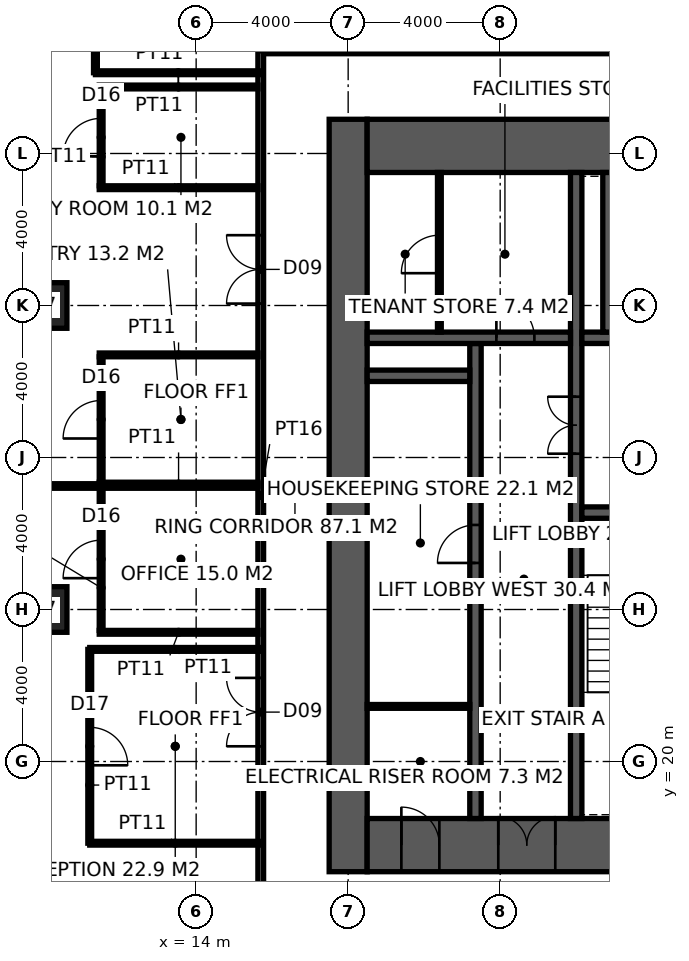
"""IFC4 building model, lengths in metres.
Left out: names, types, materials, properties, quantities, classifications, styles, units other than length and angle.
Written with IfcOpenShell. Run it as: python <this file> out.ifc"""

import sys

from ifc_helpers import new_model, si_unit, direction, frame, frame_2d, origin, origin_2d, place, context, subcontext, project, spatial, rectangle, hollow_rectangle, extrude, element, fill, save


model = new_model("IFC4")
c1 = context("Model", 3, precision=1e-05, world=origin(), true_north=direction((0.0, 1.0)))
c2 = subcontext(c1, "Body", "Model", "MODEL_VIEW")
j1 = project(units=[si_unit("LENGTHUNIT", "METRE"), si_unit("PLANEANGLEUNIT", "RADIAN")], contexts=[c1])
p1 = place(None, origin())
s1 = spatial("IfcSite", under=j1, at=p1, CompositionType="ELEMENT")
p2 = place(p1, origin())
s2 = spatial("IfcBuilding", under=s1, at=p2, CompositionType="ELEMENT")
p3 = place(p2, frame((0.0, 0.0, 15.0)))
s3 = spatial("IfcBuildingStorey", under=s2, at=p3, CompositionType="ELEMENT", Elevation=15.0)
for number, where, z_axis, x_axis in (
    (1, (10.0, 24.0, 0.0), (0.0, 0.0, 1.0), (1.0, 0.0, 0.0)),
    (2, (10.0, 32.0, 0.0), (0.0, 0.0, 1.0), (1.0, 0.0, 0.0)),
):
    element("IfcColumn", number, at=place(p3, frame(where, z_axis=z_axis, x_axis=x_axis)), inside=s3, PredefinedType="COLUMN", context=c2, shape_type="SweptSolid", body=[
        extrude(hollow_rectangle(XDim=1.2, YDim=1.2, WallThickness=0.1, at=origin_2d()), origin(), (0.0, 0.0, 1.0), 4.0),
    ])
p4 = place(p3, frame((18.0, 17.1, -0.15), z_axis=(0.0, 0.0, 1.0), x_axis=(0.0, 1.0, 0.0)))
e3 = element("IfcWall", 3, at=p4, inside=s3, PredefinedType="SHEAR", context=c2, shape_type="SweptSolid", body=[
    extrude(rectangle(XDim=19.8, YDim=1.0, at=frame_2d((9.9, 0.0))), origin(), (0.0, 0.0, 1.0), 4.0),
])
p5 = place(p3, frame((18.5, 17.8, -0.15), z_axis=(0.0, 0.0, 1.0), x_axis=(1.0, 0.0, 0.0)))
e4 = element("IfcWall", 4, at=p5, inside=s3, PredefinedType="SHEAR", context=c2, shape_type="SweptSolid", body=[
    extrude(rectangle(XDim=23.0, YDim=1.4, at=frame_2d((11.5, 0.0))), origin(), (0.0, 0.0, 1.0), 4.0),
])
p6 = place(p5, frame((3.45, 0.0, 0.15)))
e5 = element("IfcOpeningElement", 5, at=p6, cuts=e4, PredefinedType="OPENING", context=c2, shape_type="SweptSolid", body=[
    extrude(rectangle(XDim=1.5, YDim=2.4, at=frame_2d((0.75, 1.2))), frame((0.0, 0.71, 0.0), z_axis=(0.0, -1.0, 0.0), x_axis=(1.0, 0.0, 0.0)), (0.0, 0.0, 1.0), 1.42),
])
p7 = place(p5, frame((17.9, 0.0, 0.15)))
e6 = element("IfcOpeningElement", 6, at=p7, cuts=e4, PredefinedType="OPENING", context=c2, shape_type="SweptSolid", body=[
    extrude(rectangle(XDim=1.5, YDim=2.4, at=frame_2d((0.75, 1.2))), frame((0.0, 0.71, 0.0), z_axis=(0.0, -1.0, 0.0), x_axis=(1.0, 0.0, 0.0)), (0.0, 0.0, 1.0), 1.42),
])
p8 = place(p5, frame((0.9, 0.0, 0.15)))
e7 = element("IfcOpeningElement", 7, at=p8, cuts=e4, PredefinedType="OPENING", context=c2, shape_type="SweptSolid", body=[
    extrude(rectangle(XDim=1.0, YDim=2.2, at=frame_2d((0.5, 1.1))), frame((0.0, 0.71, 0.0), z_axis=(0.0, -1.0, 0.0), x_axis=(1.0, 0.0, 0.0)), (0.0, 0.0, 1.0), 1.42),
])
p9 = place(p3, frame((18.5, 36.2, -0.15), z_axis=(0.0, 0.0, 1.0), x_axis=(1.0, 0.0, 0.0)))
e8 = element("IfcWall", 8, at=p9, inside=s3, PredefinedType="SHEAR", context=c2, shape_type="SweptSolid", body=[
    extrude(rectangle(XDim=23.0, YDim=1.4, at=frame_2d((11.5, 0.0))), origin(), (0.0, 0.0, 1.0), 4.0),
])
p10 = place(p3, frame((24.0, 18.5, -0.15), z_axis=(0.0, 0.0, 1.0), x_axis=(0.0, 1.0, 0.0)))
e9 = element("IfcWall", 9, at=p10, inside=s3, PredefinedType="SHEAR", context=c2, shape_type="SweptSolid", body=[
    extrude(rectangle(XDim=17.0, YDim=0.3, at=frame_2d((8.5, 0.0))), origin(), (0.0, 0.0, 1.0), 4.0),
])
p11 = place(p10, frame((9.6, 0.0, 0.15)))
e10 = element("IfcOpeningElement", 10, at=p11, cuts=e9, PredefinedType="OPENING", context=c2, shape_type="SweptSolid", body=[
    extrude(rectangle(XDim=1.5, YDim=2.4, at=frame_2d((0.75, 1.2))), frame((0.0, 0.16, 0.0), z_axis=(0.0, -1.0, 0.0), x_axis=(1.0, 0.0, 0.0)), (0.0, 0.0, 1.0), 0.32),
])
p12 = place(p3, frame((24.15, 26.55, -0.15), z_axis=(0.0, 0.0, 1.0), x_axis=(1.0, 0.0, 0.0)))
e11 = element("IfcWall", 11, at=p12, inside=s3, PredefinedType="SHEAR", context=c2, shape_type="SweptSolid", body=[
    extrude(rectangle(XDim=11.25, YDim=0.3, at=frame_2d((5.625, 0.0))), origin(), (0.0, 0.0, 1.0), 4.0),
])
p13 = place(p12, frame((9.25, 0.0, 0.15)))
e12 = element("IfcOpeningElement", 12, at=p13, cuts=e11, PredefinedType="OPENING", context=c2, shape_type="SweptSolid", body=[
    extrude(rectangle(XDim=1.0, YDim=2.2, at=frame_2d((0.5, 1.1))), frame((0.0, 0.16, 0.0), z_axis=(0.0, -1.0, 0.0), x_axis=(1.0, 0.0, 0.0)), (0.0, 0.0, 1.0), 0.32),
])
p14 = place(p12, frame((4.9, 0.0, 0.15)))
e13 = element("IfcOpeningElement", 13, at=p14, cuts=e11, PredefinedType="OPENING", context=c2, shape_type="SweptSolid", body=[
    extrude(rectangle(XDim=1.5, YDim=2.4, at=frame_2d((0.75, 1.2))), frame((0.0, 0.16, 0.0), z_axis=(0.0, -1.0, 0.0), x_axis=(1.0, 0.0, 0.0)), (0.0, 0.0, 1.0), 0.32),
])
p15 = place(p3, frame((24.15, 31.15, -0.15), z_axis=(0.0, 0.0, 1.0), x_axis=(1.0, 0.0, 0.0)))
e14 = element("IfcWall", 14, at=p15, inside=s3, PredefinedType="SHEAR", context=c2, shape_type="SweptSolid", body=[
    extrude(rectangle(XDim=11.25, YDim=0.3, at=frame_2d((5.625, 0.0))), origin(), (0.0, 0.0, 1.0), 4.0),
])
p16 = place(p15, frame((7.25, 0.0, 0.15)))
e15 = element("IfcOpeningElement", 15, at=p16, cuts=e14, PredefinedType="OPENING", context=c2, shape_type="SweptSolid", body=[
    extrude(rectangle(XDim=1.4, YDim=2.4, at=frame_2d((0.7, 1.2))), frame((0.0, 0.16, 0.0), z_axis=(0.0, -1.0, 0.0), x_axis=(1.0, 0.0, 0.0)), (0.0, 0.0, 1.0), 0.32),
])
p17 = place(p3, frame((21.35, 18.5, -0.15), z_axis=(0.0, 0.0, 1.0), x_axis=(0.0, 1.0, 0.0)))
e16 = element("IfcWall", 16, at=p17, inside=s3, PredefinedType="SHEAR", context=c2, shape_type="SweptSolid", body=[
    extrude(rectangle(XDim=12.5, YDim=0.3, at=frame_2d((6.25, 0.0))), origin(), (0.0, 0.0, 1.0), 4.0),
])
p18 = place(p17, frame((6.725, 0.0, 0.15)))
e17 = element("IfcOpeningElement", 17, at=p18, cuts=e16, PredefinedType="OPENING", context=c2, shape_type="SweptSolid", body=[
    extrude(rectangle(XDim=1.0, YDim=2.2, at=frame_2d((0.5, 1.1))), frame((0.0, 0.16, 0.0), z_axis=(0.0, -1.0, 0.0), x_axis=(1.0, 0.0, 0.0)), (0.0, 0.0, 1.0), 0.32),
])
p19 = place(p3, frame((18.5, 31.15, -0.15), z_axis=(0.0, 0.0, 1.0), x_axis=(1.0, 0.0, 0.0)))
e18 = element("IfcWall", 18, at=p19, inside=s3, PredefinedType="SHEAR", context=c2, shape_type="SweptSolid", body=[
    extrude(rectangle(XDim=5.35, YDim=0.3, at=frame_2d((2.675, 0.0))), origin(), (0.0, 0.0, 1.0), 4.0),
])
p20 = place(p19, frame((3.4, 0.0, 0.15)))
e19 = element("IfcOpeningElement", 19, at=p20, cuts=e18, PredefinedType="OPENING", context=c2, shape_type="SweptSolid", body=[
    extrude(rectangle(XDim=1.0, YDim=2.2, at=frame_2d((0.5, 1.1))), frame((0.0, 0.16, 0.0), z_axis=(0.0, -1.0, 0.0), x_axis=(1.0, 0.0, 0.0)), (0.0, 0.0, 1.0), 0.32),
])
p21 = place(p3, frame((18.5, 30.15, -0.15), z_axis=(0.0, 0.0, 1.0), x_axis=(1.0, 0.0, 0.0)))
e20 = element("IfcWall", 20, at=p21, inside=s3, PredefinedType="SHEAR", context=c2, shape_type="SweptSolid", body=[
    extrude(rectangle(XDim=2.7, YDim=0.3, at=frame_2d((1.35, 0.0))), origin(), (0.0, 0.0, 1.0), 4.0),
])
p22 = place(p3, frame((24.85, 31.3, -0.15), z_axis=(0.0, 0.0, 1.0), x_axis=(0.0, 1.0, 0.0)))
e21 = element("IfcWall", 21, at=p22, inside=s3, PredefinedType="SHEAR", context=c2, shape_type="SweptSolid", body=[
    extrude(rectangle(XDim=4.2, YDim=0.3, at=frame_2d((2.1, 0.0))), origin(), (0.0, 0.0, 1.0), 4.0),
])
p23 = place(p3, frame((20.4, 31.3, 0.0), z_axis=(0.0, 0.0, 1.0), x_axis=(0.0, 1.0, 0.0)))
e22 = element("IfcWall", 22, at=p23, inside=s3, PredefinedType="PARTITIONING", context=c2, shape_type="SweptSolid", body=[
    extrude(rectangle(XDim=4.2, YDim=0.1, at=frame_2d((2.1, 0.0))), origin(), (0.0, 0.0, 1.0), 3.85),
])
p24 = place(p23, frame((1.55, 0.0, 0.0)))
e23 = element("IfcOpeningElement", 23, at=p24, cuts=e22, PredefinedType="OPENING", context=c2, shape_type="SweptSolid", body=[
    extrude(rectangle(XDim=1.0, YDim=2.2, at=frame_2d((0.5, 1.1))), frame((0.0, 0.06, 0.0), z_axis=(0.0, -1.0, 0.0), x_axis=(1.0, 0.0, 0.0)), (0.0, 0.0, 1.0), 0.12),
])
p25 = place(p3, frame((18.5, 21.45, 0.0), z_axis=(0.0, 0.0, 1.0), x_axis=(1.0, 0.0, 0.0)))
e24 = element("IfcWall", 24, at=p25, inside=s3, PredefinedType="PARTITIONING", context=c2, shape_type="SweptSolid", body=[
    extrude(rectangle(XDim=2.7, YDim=0.1, at=frame_2d((1.35, 0.0))), origin(), (0.0, 0.0, 1.0), 3.85),
])
p26 = place(p3, frame((15.7, 15.225, 0.0), z_axis=(0.0, 0.0, 1.0), x_axis=(0.0, 1.0, 0.0)))
e25 = element("IfcWall", 25, at=p26, inside=s3, PredefinedType="PARTITIONING", context=c2, shape_type="SweptSolid", body=[
    extrude(rectangle(XDim=23.55, YDim=0.15, at=frame_2d((11.775, 0.0))), origin(), (0.0, 0.0, 1.0), 3.85),
])
p27 = place(p26, frame((5.175, 0.0, 0.0)))
e26 = element("IfcOpeningElement", 26, at=p27, cuts=e25, PredefinedType="OPENING", context=c2, shape_type="SweptSolid", body=[
    extrude(rectangle(XDim=1.8, YDim=2.4, at=frame_2d((0.9, 1.2))), frame((0.0, 0.085, 0.0), z_axis=(0.0, -1.0, 0.0), x_axis=(1.0, 0.0, 0.0)), (0.0, 0.0, 1.0), 0.17),
])
p28 = place(p26, frame((16.825, 0.0, 0.0)))
e27 = element("IfcOpeningElement", 27, at=p28, cuts=e25, PredefinedType="OPENING", context=c2, shape_type="SweptSolid", body=[
    extrude(rectangle(XDim=1.8, YDim=2.4, at=frame_2d((0.9, 1.2))), frame((0.0, 0.085, 0.0), z_axis=(0.0, -1.0, 0.0), x_axis=(1.0, 0.0, 0.0)), (0.0, 0.0, 1.0), 0.17),
])
p29 = place(p3, frame((15.775, 38.7, 0.0), z_axis=(0.0, 0.0, 1.0), x_axis=(1.0, 0.0, 0.0)))
e28 = element("IfcWall", 28, at=p29, inside=s3, PredefinedType="PARTITIONING", context=c2, shape_type="SweptSolid", body=[
    extrude(rectangle(XDim=28.45, YDim=0.15, at=frame_2d((14.225, 0.0))), origin(), (0.0, 0.0, 1.0), 3.85),
])
p30 = place(p29, frame((7.975, 0.0, 0.0)))
e29 = element("IfcOpeningElement", 29, at=p30, cuts=e28, PredefinedType="OPENING", context=c2, shape_type="SweptSolid", body=[
    extrude(rectangle(XDim=0.9, YDim=2.1, at=frame_2d((0.45, 1.05))), frame((0.0, 0.085, 0.0), z_axis=(0.0, -1.0, 0.0), x_axis=(1.0, 0.0, 0.0)), (0.0, 0.0, 1.0), 0.17),
])
p31 = place(p29, frame((11.725, 0.0, 0.0)))
e30 = element("IfcOpeningElement", 30, at=p31, cuts=e28, PredefinedType="OPENING", context=c2, shape_type="SweptSolid", body=[
    extrude(rectangle(XDim=1.0, YDim=2.1, at=frame_2d((0.5, 1.05))), frame((0.0, 0.085, 0.0), z_axis=(0.0, -1.0, 0.0), x_axis=(1.0, 0.0, 0.0)), (0.0, 0.0, 1.0), 0.17),
])
p32 = place(p29, frame((15.575, 0.0, 0.0)))
e31 = element("IfcOpeningElement", 31, at=p32, cuts=e28, PredefinedType="OPENING", context=c2, shape_type="SweptSolid", body=[
    extrude(rectangle(XDim=0.9, YDim=2.1, at=frame_2d((0.45, 1.05))), frame((0.0, 0.085, 0.0), z_axis=(0.0, -1.0, 0.0), x_axis=(1.0, 0.0, 0.0)), (0.0, 0.0, 1.0), 0.17),
])
p33 = place(p3, frame((-1.7, 27.25, 0.0), z_axis=(0.0, 0.0, 1.0), x_axis=(1.0, 0.0, 0.0)))
e32 = element("IfcWall", 32, at=p33, inside=s3, PredefinedType="PARTITIONING", context=c2, shape_type="SweptSolid", body=[
    extrude(rectangle(XDim=17.325, YDim=0.12, at=frame_2d((8.663, 0.0))), origin(), (0.0, 0.0, 1.0), 3.85),
])
for number, where, z_axis, x_axis in (
    (33, (11.45, 23.4, 0.0), (0.0, 0.0, 1.0), (1.0, 0.0, 0.0)),
    (34, (11.45, 27.3, 0.0), (0.0, 0.0, 1.0), (1.0, 0.0, 0.0)),
    (35, (11.45, 30.7, 0.0), (0.0, 0.0, 1.0), (1.0, 0.0, 0.0)),
    (36, (11.45, 35.1, 0.0), (0.0, 0.0, 1.0), (1.0, 0.0, 0.0)),
    (37, (11.45, 37.75, 0.0), (0.0, 0.0, 1.0), (1.0, 0.0, 0.0)),
):
    element("IfcWall", number, at=place(p3, frame(where, z_axis=z_axis, x_axis=x_axis)), inside=s3, PredefinedType="PARTITIONING", context=c2, shape_type="SweptSolid", body=[
        extrude(rectangle(XDim=4.175, YDim=0.1, at=frame_2d((2.087, 0.0))), origin(), (0.0, 0.0, 1.0), 3.85),
    ])
p34 = place(p3, frame((11.5, 23.45, 0.0), z_axis=(0.0, 0.0, 1.0), x_axis=(0.0, 1.0, 0.0)))
e38 = element("IfcWall", 38, at=p34, inside=s3, PredefinedType="PARTITIONING", context=c2, shape_type="SweptSolid", body=[
    extrude(rectangle(XDim=3.739, YDim=0.1, at=frame_2d((1.87, 0.0))), origin(), (0.0, 0.0, 1.0), 3.85),
])
p35 = place(p34, frame((1.375, 0.0, 0.0)))
e39 = element("IfcOpeningElement", 39, at=p35, cuts=e38, PredefinedType="OPENING", context=c2, shape_type="SweptSolid", body=[
    extrude(rectangle(XDim=1.0, YDim=2.2, at=frame_2d((0.5, 1.1))), frame((0.0, 0.06, 0.0), z_axis=(0.0, -1.0, 0.0), x_axis=(1.0, 0.0, 0.0)), (0.0, 0.0, 1.0), 0.12),
])
p36 = place(p3, frame((11.5, 27.35, 0.0), z_axis=(0.0, 0.0, 1.0), x_axis=(0.0, 1.0, 0.0)))
e40 = element("IfcWall", 40, at=p36, inside=s3, PredefinedType="PARTITIONING", context=c2, shape_type="SweptSolid", body=[
    extrude(rectangle(XDim=3.3, YDim=0.1, at=frame_2d((1.65, 0.0))), origin(), (0.0, 0.0, 1.0), 3.85),
])
p37 = place(p36, frame((1.15, 0.0, 0.0)))
e41 = element("IfcOpeningElement", 41, at=p37, cuts=e40, PredefinedType="OPENING", context=c2, shape_type="SweptSolid", body=[
    extrude(rectangle(XDim=1.0, YDim=2.2, at=frame_2d((0.5, 1.1))), frame((0.0, 0.06, 0.0), z_axis=(0.0, -1.0, 0.0), x_axis=(1.0, 0.0, 0.0)), (0.0, 0.0, 1.0), 0.12),
])
p38 = place(p3, frame((11.5, 35.15, 0.0), z_axis=(0.0, 0.0, 1.0), x_axis=(0.0, 1.0, 0.0)))
e42 = element("IfcWall", 42, at=p38, inside=s3, PredefinedType="PARTITIONING", context=c2, shape_type="SweptSolid", body=[
    extrude(rectangle(XDim=2.55, YDim=0.1, at=frame_2d((1.275, 0.0))), origin(), (0.0, 0.0, 1.0), 3.85),
])
p39 = place(p38, frame((0.775, 0.0, 0.0)))
e43 = element("IfcOpeningElement", 43, at=p39, cuts=e42, PredefinedType="OPENING", context=c2, shape_type="SweptSolid", body=[
    extrude(rectangle(XDim=1.0, YDim=2.2, at=frame_2d((0.5, 1.1))), frame((0.0, 0.06, 0.0), z_axis=(0.0, -1.0, 0.0), x_axis=(1.0, 0.0, 0.0)), (0.0, 0.0, 1.0), 0.12),
])
p40 = place(p3, frame((15.7, 22.95, 0.0), z_axis=(0.0, 0.0, 1.0), x_axis=(-1.0, 0.0, 0.0)))
e44 = element("IfcWall", 44, at=p40, inside=s3, PredefinedType="PARTITIONING", context=c2, shape_type="SweptSolid", body=[
    extrude(rectangle(XDim=4.5, YDim=0.1, at=frame_2d((2.25, 0.0))), origin(), (0.0, 0.0, 1.0), 3.85),
])
p41 = place(p3, frame((11.2, 22.95, 0.0), z_axis=(0.0, 0.0, 1.0), x_axis=(0.0, -1.0, 0.0)))
e45 = element("IfcWall", 45, at=p41, inside=s3, PredefinedType="PARTITIONING", context=c2, shape_type="SweptSolid", body=[
    extrude(rectangle(XDim=5.1, YDim=0.1, at=frame_2d((2.55, 0.0))), origin(), (0.0, 0.0, 1.0), 3.85),
])
p42 = place(p41, frame((2.05, 0.0, 0.0)))
e46 = element("IfcOpeningElement", 46, at=p42, cuts=e45, PredefinedType="OPENING", context=c2, shape_type="SweptSolid", body=[
    extrude(rectangle(XDim=1.0, YDim=2.2, at=frame_2d((0.5, 1.1))), frame((0.0, 0.06, 0.0), z_axis=(0.0, -1.0, 0.0), x_axis=(1.0, 0.0, 0.0)), (0.0, 0.0, 1.0), 0.12),
])
p43 = place(p3, frame((11.2, 17.85, 0.0), z_axis=(0.0, 0.0, 1.0), x_axis=(1.0, 0.0, 0.0)))
e47 = element("IfcWall", 47, at=p43, inside=s3, PredefinedType="PARTITIONING", context=c2, shape_type="SweptSolid", body=[
    extrude(rectangle(XDim=4.5, YDim=0.1, at=frame_2d((2.25, 0.0))), origin(), (0.0, 0.0, 1.0), 3.85),
])
p44 = place(p3, frame((11.35, 42.775, 0.0), z_axis=(0.0, 0.0, 1.0), x_axis=(0.0, -1.0, 0.0)))
e48 = element("IfcWall", 48, at=p44, inside=s3, PredefinedType="PARTITIONING", context=c2, shape_type="SweptSolid", body=[
    extrude(rectangle(XDim=4.65, YDim=0.1, at=frame_2d((2.325, 0.0))), origin(), (0.0, 0.0, 1.0), 3.85),
])
p45 = place(p44, frame((1.025, 0.0, 0.0)))
e49 = element("IfcOpeningElement", 49, at=p45, cuts=e48, PredefinedType="OPENING", context=c2, shape_type="SweptSolid", body=[
    extrude(rectangle(XDim=1.0, YDim=2.2, at=frame_2d((0.5, 1.1))), frame((0.0, 0.06, 0.0), z_axis=(0.0, -1.0, 0.0), x_axis=(1.0, 0.0, 0.0)), (0.0, 0.0, 1.0), 0.12),
])
p46 = place(p3, frame((11.35, 38.125, 0.0), z_axis=(0.0, 0.0, 1.0), x_axis=(1.0, 0.0, 0.0)))
e50 = element("IfcWall", 50, at=p46, inside=s3, PredefinedType="PARTITIONING", context=c2, shape_type="SweptSolid", body=[
    extrude(rectangle(XDim=4.35, YDim=0.1, at=frame_2d((2.175, 0.0))), origin(), (0.0, 0.0, 1.0), 3.85),
])
p47 = place(p11, origin())
e51 = element("IfcDoor", 51, at=p47, inside=s3, OperationType="DOUBLE_DOOR_DOUBLE_SWING", PredefinedType="DOOR", context=c2, shape_type="SweptSolid", body=[
    extrude(rectangle(XDim=1.5, YDim=2.4, at=frame_2d((0.75, 1.2))), frame((0.0, 0.025, 0.0), z_axis=(0.0, -1.0, 0.0), x_axis=(1.0, 0.0, 0.0)), (0.0, 0.0, 1.0), 0.05),
])
fill(e10, e51)
p48 = place(p20, origin())
e52 = element("IfcDoor", 52, at=p48, inside=s3, OperationType="SINGLE_SWING_LEFT", PredefinedType="DOOR", context=c2, shape_type="SweptSolid", body=[
    extrude(rectangle(XDim=1.0, YDim=2.2, at=frame_2d((0.5, 1.1))), frame((0.0, 0.025, 0.0), z_axis=(0.0, -1.0, 0.0), x_axis=(1.0, 0.0, 0.0)), (0.0, 0.0, 1.0), 0.05),
])
fill(e19, e52)
p49 = place(p24, origin())
e53 = element("IfcDoor", 53, at=p49, inside=s3, OperationType="SINGLE_SWING_LEFT", PredefinedType="DOOR", context=c2, shape_type="SweptSolid", body=[
    extrude(rectangle(XDim=1.0, YDim=2.2, at=frame_2d((0.5, 1.1))), frame((0.0, 0.025, 0.0), z_axis=(0.0, -1.0, 0.0), x_axis=(1.0, 0.0, 0.0)), (0.0, 0.0, 1.0), 0.05),
])
fill(e23, e53)
p50 = place(p18, origin())
e54 = element("IfcDoor", 54, at=p50, inside=s3, OperationType="SINGLE_SWING_LEFT", PredefinedType="DOOR", context=c2, shape_type="SweptSolid", body=[
    extrude(rectangle(XDim=1.0, YDim=2.2, at=frame_2d((0.5, 1.1))), frame((0.0, 0.025, 0.0), z_axis=(0.0, -1.0, 0.0), x_axis=(1.0, 0.0, 0.0)), (0.0, 0.0, 1.0), 0.05),
])
fill(e17, e54)
p51 = place(p6, origin())
e55 = element("IfcDoor", 55, at=p51, inside=s3, OperationType="DOUBLE_DOOR_DOUBLE_SWING", PredefinedType="DOOR", context=c2, shape_type="SweptSolid", body=[
    extrude(rectangle(XDim=1.5, YDim=2.4, at=frame_2d((0.75, 1.2))), frame((0.0, 0.025, 0.0), z_axis=(0.0, -1.0, 0.0), x_axis=(1.0, 0.0, 0.0)), (0.0, 0.0, 1.0), 0.05),
])
fill(e5, e55)
p52 = place(p8, origin())
e56 = element("IfcDoor", 56, at=p52, inside=s3, OperationType="SINGLE_SWING_LEFT", PredefinedType="DOOR", context=c2, shape_type="SweptSolid", body=[
    extrude(rectangle(XDim=1.0, YDim=2.2, at=frame_2d((0.5, 1.1))), frame((0.0, 0.025, 0.0), z_axis=(0.0, -1.0, 0.0), x_axis=(1.0, 0.0, 0.0)), (0.0, 0.0, 1.0), 0.05),
])
fill(e7, e56)
p53 = place(p30, origin())
e57 = element("IfcDoor", 57, at=p53, inside=s3, OperationType="SINGLE_SWING_LEFT", PredefinedType="DOOR", context=c2, shape_type="SweptSolid", body=[
    extrude(rectangle(XDim=0.9, YDim=2.1, at=frame_2d((0.45, 1.05))), frame((0.0, 0.025, 0.0), z_axis=(0.0, -1.0, 0.0), x_axis=(1.0, 0.0, 0.0)), (0.0, 0.0, 1.0), 0.05),
])
fill(e29, e57)
p54 = place(p27, origin())
e58 = element("IfcDoor", 58, at=p54, inside=s3, OperationType="DOUBLE_DOOR_DOUBLE_SWING", PredefinedType="DOOR", context=c2, shape_type="SweptSolid", body=[
    extrude(rectangle(XDim=1.8, YDim=2.4, at=frame_2d((0.9, 1.2))), frame((0.0, 0.025, 0.0), z_axis=(0.0, -1.0, 0.0), x_axis=(1.0, 0.0, 0.0)), (0.0, 0.0, 1.0), 0.05),
])
fill(e26, e58)
p55 = place(p28, origin())
e59 = element("IfcDoor", 59, at=p55, inside=s3, OperationType="DOUBLE_DOOR_DOUBLE_SWING", PredefinedType="DOOR", context=c2, shape_type="SweptSolid", body=[
    extrude(rectangle(XDim=1.8, YDim=2.4, at=frame_2d((0.9, 1.2))), frame((0.0, 0.025, 0.0), z_axis=(0.0, -1.0, 0.0), x_axis=(1.0, 0.0, 0.0)), (0.0, 0.0, 1.0), 0.05),
])
fill(e27, e59)
p56 = place(p35, origin())
e60 = element("IfcDoor", 60, at=p56, inside=s3, OperationType="SINGLE_SWING_LEFT", PredefinedType="DOOR", context=c2, shape_type="SweptSolid", body=[
    extrude(rectangle(XDim=1.0, YDim=2.2, at=frame_2d((0.5, 1.1))), frame((0.0, 0.025, 0.0), z_axis=(0.0, -1.0, 0.0), x_axis=(1.0, 0.0, 0.0)), (0.0, 0.0, 1.0), 0.05),
])
fill(e39, e60)
p57 = place(p37, origin())
e61 = element("IfcDoor", 61, at=p57, inside=s3, OperationType="SINGLE_SWING_LEFT", PredefinedType="DOOR", context=c2, shape_type="SweptSolid", body=[
    extrude(rectangle(XDim=1.0, YDim=2.2, at=frame_2d((0.5, 1.1))), frame((0.0, 0.025, 0.0), z_axis=(0.0, -1.0, 0.0), x_axis=(1.0, 0.0, 0.0)), (0.0, 0.0, 1.0), 0.05),
])
fill(e41, e61)
p58 = place(p39, origin())
e62 = element("IfcDoor", 62, at=p58, inside=s3, OperationType="SINGLE_SWING_LEFT", PredefinedType="DOOR", context=c2, shape_type="SweptSolid", body=[
    extrude(rectangle(XDim=1.0, YDim=2.2, at=frame_2d((0.5, 1.1))), frame((0.0, 0.025, 0.0), z_axis=(0.0, -1.0, 0.0), x_axis=(1.0, 0.0, 0.0)), (0.0, 0.0, 1.0), 0.05),
])
fill(e43, e62)
p59 = place(p42, origin())
e63 = element("IfcDoor", 63, at=p59, inside=s3, OperationType="SINGLE_SWING_RIGHT", PredefinedType="DOOR", context=c2, shape_type="SweptSolid", body=[
    extrude(rectangle(XDim=1.0, YDim=2.2, at=frame_2d((0.5, 1.1))), frame((0.0, 0.025, 0.0), z_axis=(0.0, -1.0, 0.0), x_axis=(1.0, 0.0, 0.0)), (0.0, 0.0, 1.0), 0.05),
])
fill(e46, e63)
save(model, sys.argv[1])
